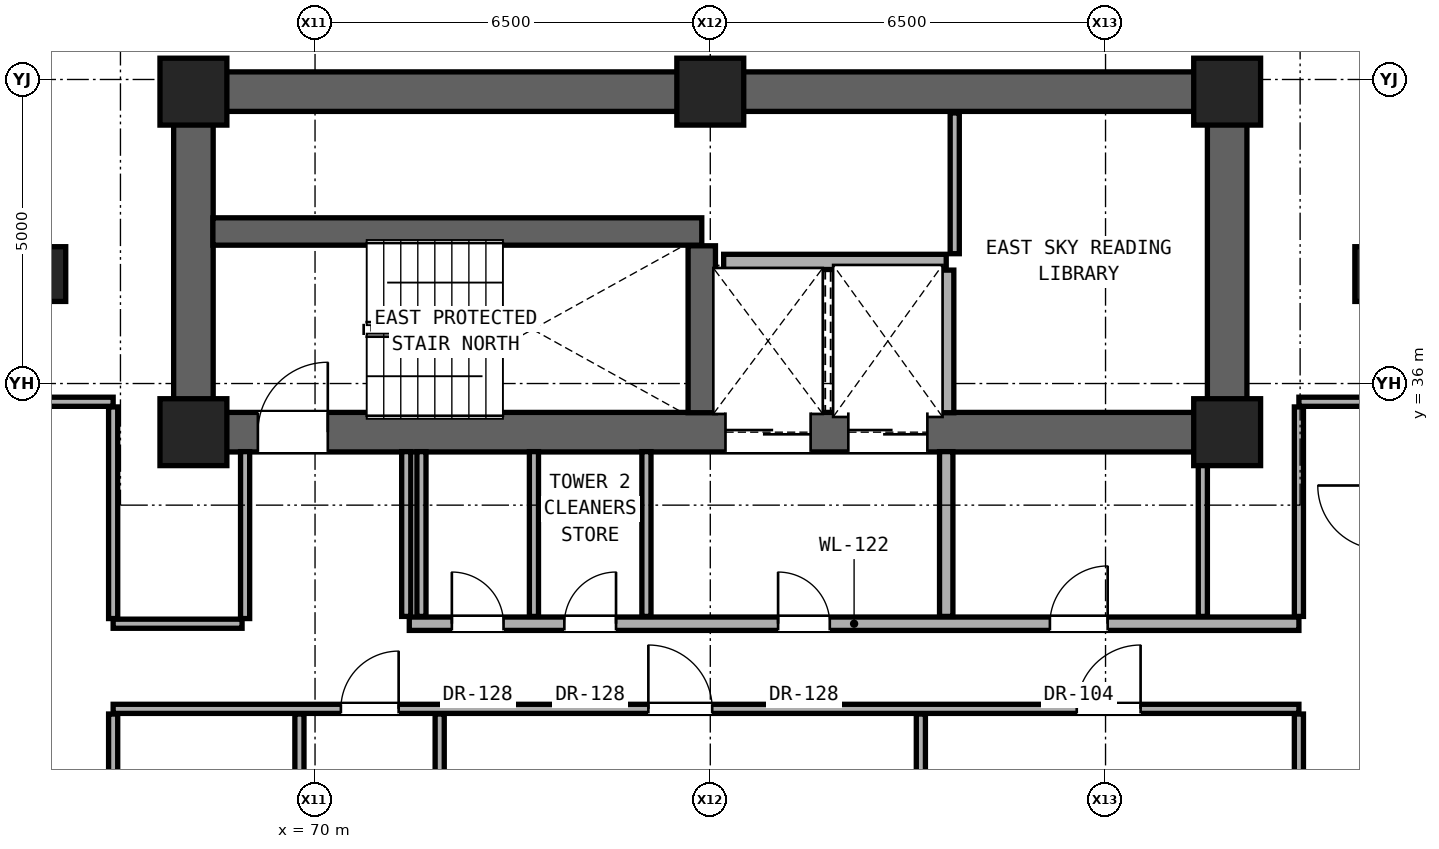
"""IFC4 building model, lengths in metres.
Left out: names, types, materials, properties, quantities, classifications, styles, units other than length and angle.
Written with IfcOpenShell. Run it as: python <this file> out.ifc"""

import sys

from ifc_helpers import new_model, si_unit, direction, frame, frame_2d, origin, origin_2d, place, context, subcontext, project, spatial, rectangle, extrude, element, fill, save


model = new_model("IFC4")
c1 = context("Model", 3, precision=1e-05, world=origin(), true_north=direction((0.0, 1.0)))
c2 = subcontext(c1, "Body", "Model", "MODEL_VIEW")
j1 = project(units=[si_unit("LENGTHUNIT", "METRE"), si_unit("PLANEANGLEUNIT", "RADIAN")], contexts=[c1])
p1 = place(None, origin())
s1 = spatial("IfcSite", under=j1, at=p1, CompositionType="ELEMENT")
p2 = place(p1, origin())
s2 = spatial("IfcBuilding", under=s1, at=p2, CompositionType="ELEMENT")
p3 = place(p2, frame((0.0, 0.0, 124.7)))
s3 = spatial("IfcBuildingStorey", under=s2, at=p3, CompositionType="ELEMENT", Elevation=124.7)
for number, where, z_axis, x_axis in (
    (1, (68.0, 35.2, 0.0), (0.0, 0.0, 1.0), (1.0, 0.0, 0.0)),
    (2, (85.0, 35.2, 0.0), (0.0, 0.0, 1.0), (1.0, 0.0, 0.0)),
    (3, (68.0, 40.8, 0.0), (0.0, 0.0, 1.0), (1.0, 0.0, 0.0)),
    (4, (76.5, 40.8, 0.0), (0.0, 0.0, 1.0), (1.0, 0.0, 0.0)),
    (5, (85.0, 40.8, 0.0), (0.0, 0.0, 1.0), (1.0, 0.0, 0.0)),
):
    element("IfcColumn", number, at=place(p3, frame(where, z_axis=z_axis, x_axis=x_axis)), inside=s3, PredefinedType="COLUMN", context=c2, shape_type="SweptSolid", body=[
        extrude(rectangle(XDim=1.1, YDim=1.1, at=origin_2d()), origin(), (0.0, 0.0, 1.0), 3.3),
    ])
for number, where, z_axis, x_axis in (
    (6, (65.6, 37.8, 0.0), (0.0, 0.0, 1.0), (1.0, 0.0, 0.0)),
    (7, (87.4, 37.8, 0.0), (0.0, 0.0, 1.0), (1.0, 0.0, 0.0)),
):
    element("IfcColumn", number, at=place(p3, frame(where, z_axis=z_axis, x_axis=x_axis)), inside=s3, PredefinedType="PILASTER", context=c2, shape_type="SweptSolid", body=[
        extrude(rectangle(XDim=0.6, YDim=0.9, at=origin_2d()), origin(), (0.0, 0.0, 1.0), 3.3),
    ])
p4 = place(p3, frame((68.0, 40.8, 0.0), z_axis=(0.0, 0.0, 1.0), x_axis=(1.0, 0.0, 0.0)))
e8 = element("IfcWall", 8, at=p4, inside=s3, PredefinedType="SHEAR", context=c2, shape_type="SweptSolid", body=[
    extrude(rectangle(XDim=17.0, YDim=0.65, at=frame_2d((8.5, 0.0))), origin(), (0.0, 0.0, 1.0), 3.08),
])
for number, where, z_axis, x_axis in (
    (9, (68.0, 35.2, 0.0), (0.0, 0.0, 1.0), (0.0, 1.0, 0.0)),
    (10, (85.0, 35.2, 0.0), (0.0, 0.0, 1.0), (0.0, 1.0, 0.0)),
):
    element("IfcWall", number, at=place(p3, frame(where, z_axis=z_axis, x_axis=x_axis)), inside=s3, PredefinedType="SHEAR", context=c2, shape_type="SweptSolid", body=[
        extrude(rectangle(XDim=5.6, YDim=0.65, at=frame_2d((2.8, 0.0))), origin(), (0.0, 0.0, 1.0), 3.08),
    ])
p5 = place(p3, frame((68.0, 35.2, 0.0), z_axis=(0.0, 0.0, 1.0), x_axis=(1.0, 0.0, 0.0)))
e11 = element("IfcWall", 11, at=p5, inside=s3, PredefinedType="SHEAR", context=c2, shape_type="SweptSolid", body=[
    extrude(rectangle(XDim=17.0, YDim=0.65, at=frame_2d((8.5, 0.0))), origin(), (0.0, 0.0, 1.0), 3.08),
])
p6 = place(p5, frame((1.06, 0.0, 0.0)))
e12 = element("IfcOpeningElement", 12, at=p6, cuts=e11, PredefinedType="OPENING", context=c2, shape_type="SweptSolid", body=[
    extrude(rectangle(XDim=1.15, YDim=2.2, at=frame_2d((0.575, 1.1))), frame((0.0, 0.335, 0.0), z_axis=(0.0, -1.0, 0.0), x_axis=(1.0, 0.0, 0.0)), (0.0, 0.0, 1.0), 0.67),
])
p7 = place(p5, frame((8.75, 0.0, 0.0)))
e13 = element("IfcOpeningElement", 13, at=p7, cuts=e11, PredefinedType="OPENING", context=c2, shape_type="SweptSolid", body=[
    extrude(rectangle(XDim=1.4, YDim=2.35, at=frame_2d((0.7, 1.175))), frame((0.0, 0.335, 0.0), z_axis=(0.0, -1.0, 0.0), x_axis=(1.0, 0.0, 0.0)), (0.0, 0.0, 1.0), 0.67),
])
p8 = place(p5, frame((10.77, 0.0, 0.0)))
e14 = element("IfcOpeningElement", 14, at=p8, cuts=e11, PredefinedType="OPENING", context=c2, shape_type="SweptSolid", body=[
    extrude(rectangle(XDim=1.3, YDim=2.3, at=frame_2d((0.65, 1.15))), frame((0.0, 0.335, 0.0), z_axis=(0.0, -1.0, 0.0), x_axis=(1.0, 0.0, 0.0)), (0.0, 0.0, 1.0), 0.67),
])
p9 = place(p3, frame((66.68, 30.65, 0.0), z_axis=(0.0, 0.0, 1.0), x_axis=(1.0, 0.0, 0.0)))
e15 = element("IfcWall", 15, at=p9, inside=s3, PredefinedType="PARTITIONING", context=c2, shape_type="SweptSolid", body=[
    extrude(rectangle(XDim=19.5, YDim=0.15, at=frame_2d((9.75, 0.0))), origin(), (0.0, 0.0, 1.0), 2.216),
])
p10 = place(p9, frame((3.745, 0.0, 0.0)))
e16 = element("IfcOpeningElement", 16, at=p10, cuts=e15, PredefinedType="OPENING", context=c2, shape_type="SweptSolid", body=[
    extrude(rectangle(XDim=0.95, YDim=2.15, at=frame_2d((0.475, 1.075))), frame((0.0, 0.085, 0.0), z_axis=(0.0, -1.0, 0.0), x_axis=(1.0, 0.0, 0.0)), (0.0, 0.0, 1.0), 0.17),
])
p11 = place(p9, frame((8.802, 0.0, 0.0)))
e17 = element("IfcOpeningElement", 17, at=p11, cuts=e15, PredefinedType="OPENING", context=c2, shape_type="SweptSolid", body=[
    extrude(rectangle(XDim=1.05, YDim=2.2, at=frame_2d((0.525, 1.1))), frame((0.0, 0.085, 0.0), z_axis=(0.0, -1.0, 0.0), x_axis=(1.0, 0.0, 0.0)), (0.0, 0.0, 1.0), 0.17),
])
p12 = place(p9, frame((15.846, 0.0, 0.0)))
e18 = element("IfcOpeningElement", 18, at=p12, cuts=e15, PredefinedType="OPENING", context=c2, shape_type="SweptSolid", body=[
    extrude(rectangle(XDim=1.05, YDim=2.2, at=frame_2d((0.525, 1.1))), frame((0.0, 0.085, 0.0), z_axis=(0.0, -1.0, 0.0), x_axis=(1.0, 0.0, 0.0)), (0.0, 0.0, 1.0), 0.17),
])
p13 = place(p3, frame((66.68, 32.05, 0.0), z_axis=(0.0, 0.0, 1.0), x_axis=(1.0, 0.0, 0.0)))
e19 = element("IfcWall", 19, at=p13, inside=s3, PredefinedType="PARTITIONING", context=c2, shape_type="SweptSolid", body=[
    extrude(rectangle(XDim=2.12, YDim=0.15, at=frame_2d((1.06, 0.0))), origin(), (0.0, 0.0, 1.0), 2.216),
])
p14 = place(p3, frame((71.55, 32.05, 0.0), z_axis=(0.0, 0.0, 1.0), x_axis=(1.0, 0.0, 0.0)))
e20 = element("IfcWall", 20, at=p14, inside=s3, PredefinedType="SOLIDWALL", context=c2, shape_type="SweptSolid", body=[
    extrude(rectangle(XDim=14.63, YDim=0.22, at=frame_2d((7.315, 0.0))), origin(), (0.0, 0.0, 1.0), 2.216),
])
p15 = place(p14, frame((6.065, 0.0, 0.0)))
e21 = element("IfcOpeningElement", 21, at=p15, cuts=e20, PredefinedType="OPENING", context=c2, shape_type="SweptSolid", body=[
    extrude(rectangle(XDim=0.85, YDim=2.01, at=frame_2d((0.425, 1.005))), frame((0.0, 0.12, 0.0), z_axis=(0.0, -1.0, 0.0), x_axis=(1.0, 0.0, 0.0)), (0.0, 0.0, 1.0), 0.24),
])
p16 = place(p14, frame((10.535, 0.0, 0.0)))
e22 = element("IfcOpeningElement", 22, at=p16, cuts=e20, PredefinedType="OPENING", context=c2, shape_type="SweptSolid", body=[
    extrude(rectangle(XDim=0.95, YDim=2.15, at=frame_2d((0.475, 1.075))), frame((0.0, 0.12, 0.0), z_axis=(0.0, -1.0, 0.0), x_axis=(1.0, 0.0, 0.0)), (0.0, 0.0, 1.0), 0.24),
])
p17 = place(p14, frame((0.7, 0.0, 0.0)))
e23 = element("IfcOpeningElement", 23, at=p17, cuts=e20, PredefinedType="OPENING", context=c2, shape_type="SweptSolid", body=[
    extrude(rectangle(XDim=0.85, YDim=2.01, at=frame_2d((0.425, 1.005))), frame((0.0, 0.12, 0.0), z_axis=(0.0, -1.0, 0.0), x_axis=(1.0, 0.0, 0.0)), (0.0, 0.0, 1.0), 0.24),
])
p18 = place(p14, frame((2.55, 0.0, 0.0)))
e24 = element("IfcOpeningElement", 24, at=p18, cuts=e20, PredefinedType="OPENING", context=c2, shape_type="SweptSolid", body=[
    extrude(rectangle(XDim=0.85, YDim=2.01, at=frame_2d((0.425, 1.005))), frame((0.0, 0.12, 0.0), z_axis=(0.0, -1.0, 0.0), x_axis=(1.0, 0.0, 0.0)), (0.0, 0.0, 1.0), 0.24),
])
p19 = place(p3, frame((65.32, 35.7, 0.0), z_axis=(0.0, 0.0, 1.0), x_axis=(1.0, 0.0, 0.0)))
e25 = element("IfcWall", 25, at=p19, inside=s3, PredefinedType="PARTITIONING", context=c2, shape_type="SweptSolid", body=[
    extrude(rectangle(XDim=1.36, YDim=0.15, at=frame_2d((0.68, 0.0))), origin(), (0.0, 0.0, 1.0), 3.08),
])
p20 = place(p3, frame((86.18, 35.7, 0.0), z_axis=(0.0, 0.0, 1.0), x_axis=(1.0, 0.0, 0.0)))
e26 = element("IfcWall", 26, at=p20, inside=s3, PredefinedType="PARTITIONING", context=c2, shape_type="SweptSolid", body=[
    extrude(rectangle(XDim=1.36, YDim=0.15, at=frame_2d((0.68, 0.0))), origin(), (0.0, 0.0, 1.0), 3.08),
])
p21 = place(p3, frame((76.72, 38.0, 0.0), z_axis=(0.0, 0.0, 1.0), x_axis=(1.0, 0.0, 0.0)))
e27 = element("IfcWall", 27, at=p21, inside=s3, PredefinedType="SOLIDWALL", context=c2, shape_type="SweptSolid", body=[
    extrude(rectangle(XDim=3.66, YDim=0.25, at=frame_2d((1.83, 0.0))), origin(), (0.0, 0.0, 1.0), 3.08),
])
p22 = place(p3, frame((68.32, 38.5, 0.0), z_axis=(0.0, 0.0, 1.0), x_axis=(1.0, 0.0, 0.0)))
e28 = element("IfcWall", 28, at=p22, inside=s3, PredefinedType="SHEAR", context=c2, shape_type="SweptSolid", body=[
    extrude(rectangle(XDim=8.04, YDim=0.45, at=frame_2d((4.02, 0.0))), origin(), (0.0, 0.0, 1.0), 3.08),
])
p23 = place(p3, frame((66.68, 24.935, 0.0), z_axis=(0.0, 0.0, 1.0), x_axis=(0.0, 1.0, 0.0)))
e29 = element("IfcWall", 29, at=p23, inside=s3, PredefinedType="PARTITIONING", context=c2, shape_type="SweptSolid", body=[
    extrude(rectangle(XDim=5.63, YDim=0.15, at=frame_2d((2.815, 0.0))), origin(), (0.0, 0.0, 1.0), 2.376),
])
p24 = place(p23, frame((2.34, 0.0, 0.0)))
e30 = element("IfcOpeningElement", 30, at=p24, cuts=e29, PredefinedType="OPENING", context=c2, shape_type="SweptSolid", body=[
    extrude(rectangle(XDim=0.95, YDim=2.15, at=frame_2d((0.475, 1.075))), frame((0.0, 0.085, 0.0), z_axis=(0.0, -1.0, 0.0), x_axis=(1.0, 0.0, 0.0)), (0.0, 0.0, 1.0), 0.17),
])
p25 = place(p3, frame((66.68, 32.135, 0.0), z_axis=(0.0, 0.0, 1.0), x_axis=(0.0, 1.0, 0.0)))
e31 = element("IfcWall", 31, at=p25, inside=s3, PredefinedType="PARTITIONING", context=c2, shape_type="SweptSolid", body=[
    extrude(rectangle(XDim=3.48, YDim=0.15, at=frame_2d((1.74, 0.0))), origin(), (0.0, 0.0, 1.0), 2.472),
])
p26 = place(p3, frame((68.85, 32.135, 0.0), z_axis=(0.0, 0.0, 1.0), x_axis=(0.0, 1.0, 0.0)))
e32 = element("IfcWall", 32, at=p26, inside=s3, PredefinedType="PARTITIONING", context=c2, shape_type="SweptSolid", body=[
    extrude(rectangle(XDim=2.745, YDim=0.15, at=frame_2d((1.373, 0.0))), origin(), (0.0, 0.0, 1.0), 3.08),
])
p27 = place(p3, frame((69.743, 24.935, 0.0), z_axis=(0.0, 0.0, 1.0), x_axis=(0.0, 1.0, 0.0)))
e33 = element("IfcWall", 33, at=p27, inside=s3, PredefinedType="PARTITIONING", context=c2, shape_type="SweptSolid", body=[
    extrude(rectangle(XDim=5.63, YDim=0.15, at=frame_2d((2.815, 0.0))), origin(), (0.0, 0.0, 1.0), 2.216),
])
for number, where, z_axis, x_axis in (
    (34, (71.5, 32.17, 0.0), (0.0, 0.0, 1.0), (0.0, 1.0, 0.0)),
    (35, (71.75, 32.17, 0.0), (0.0, 0.0, 1.0), (0.0, 1.0, 0.0)),
):
    element("IfcWall", number, at=place(p3, frame(where, z_axis=z_axis, x_axis=x_axis)), inside=s3, PredefinedType="PARTITIONING", context=c2, shape_type="SweptSolid", body=[
        extrude(rectangle(XDim=2.71, YDim=0.15, at=frame_2d((1.355, 0.0))), origin(), (0.0, 0.0, 1.0), 3.08),
    ])
p28 = place(p3, frame((72.05, 26.17, 0.0), z_axis=(0.0, 0.0, 1.0), x_axis=(0.0, 1.0, 0.0)))
e36 = element("IfcWall", 36, at=p28, inside=s3, PredefinedType="PARTITIONING", context=c2, shape_type="SweptSolid", body=[
    extrude(rectangle(XDim=4.395, YDim=0.15, at=frame_2d((2.198, 0.0))), origin(), (0.0, 0.0, 1.0), 2.216),
])
for number, where, z_axis, x_axis in (
    (37, (73.6, 32.17, 0.0), (0.0, 0.0, 1.0), (0.0, 1.0, 0.0)),
    (38, (75.45, 32.17, 0.0), (0.0, 0.0, 1.0), (0.0, 1.0, 0.0)),
):
    element("IfcWall", number, at=place(p3, frame(where, z_axis=z_axis, x_axis=x_axis)), inside=s3, PredefinedType="PARTITIONING", context=c2, shape_type="SweptSolid", body=[
        extrude(rectangle(XDim=2.71, YDim=0.15, at=frame_2d((1.355, 0.0))), origin(), (0.0, 0.0, 1.0), 3.08),
    ])
p29 = place(p3, frame((76.36, 35.52, 0.0), z_axis=(0.0, 0.0, 1.0), x_axis=(0.0, 1.0, 0.0)))
e39 = element("IfcWall", 39, at=p29, inside=s3, PredefinedType="SHEAR", context=c2, shape_type="SweptSolid", body=[
    extrude(rectangle(XDim=2.745, YDim=0.45, at=frame_2d((1.373, 0.0))), origin(), (0.0, 0.0, 1.0), 3.08),
])
p30 = place(p3, frame((79.963, 26.17, 0.0), z_axis=(0.0, 0.0, 1.0), x_axis=(0.0, 1.0, 0.0)))
e40 = element("IfcWall", 40, at=p30, inside=s3, PredefinedType="PARTITIONING", context=c2, shape_type="SweptSolid", body=[
    extrude(rectangle(XDim=4.395, YDim=0.15, at=frame_2d((2.198, 0.0))), origin(), (0.0, 0.0, 1.0), 2.216),
])
p31 = place(p3, frame((80.38, 32.17, 0.0), z_axis=(0.0, 0.0, 1.0), x_axis=(0.0, 1.0, 0.0)))
e41 = element("IfcWall", 41, at=p31, inside=s3, PredefinedType="SOLIDWALL", context=c2, shape_type="SweptSolid", body=[
    extrude(rectangle(XDim=2.71, YDim=0.22, at=frame_2d((1.355, 0.0))), origin(), (0.0, 0.0, 1.0), 3.08),
])
p32 = place(p3, frame((80.38, 35.52, 0.0), z_axis=(0.0, 0.0, 1.0), x_axis=(0.0, 1.0, 0.0)))
e42 = element("IfcWall", 42, at=p32, inside=s3, PredefinedType="SOLIDWALL", context=c2, shape_type="SweptSolid", body=[
    extrude(rectangle(XDim=2.345, YDim=0.25, at=frame_2d((1.172, 0.0))), origin(), (0.0, 0.0, 1.0), 3.08),
])
p33 = place(p3, frame((80.52, 38.135, 0.0), z_axis=(0.0, 0.0, 1.0), x_axis=(0.0, 1.0, 0.0)))
e43 = element("IfcWall", 43, at=p33, inside=s3, PredefinedType="PARTITIONING", context=c2, shape_type="SweptSolid", body=[
    extrude(rectangle(XDim=2.315, YDim=0.15, at=frame_2d((1.157, 0.0))), origin(), (0.0, 0.0, 1.0), 3.08),
])
p34 = place(p3, frame((84.6, 32.17, 0.0), z_axis=(0.0, 0.0, 1.0), x_axis=(0.0, 1.0, 0.0)))
e44 = element("IfcWall", 44, at=p34, inside=s3, PredefinedType="PARTITIONING", context=c2, shape_type="SweptSolid", body=[
    extrude(rectangle(XDim=2.71, YDim=0.15, at=frame_2d((1.355, 0.0))), origin(), (0.0, 0.0, 1.0), 3.08),
])
p35 = place(p3, frame((86.18, 26.17, 0.0), z_axis=(0.0, 0.0, 1.0), x_axis=(0.0, 1.0, 0.0)))
e45 = element("IfcWall", 45, at=p35, inside=s3, PredefinedType="PARTITIONING", context=c2, shape_type="SweptSolid", body=[
    extrude(rectangle(XDim=4.395, YDim=0.15, at=frame_2d((2.198, 0.0))), origin(), (0.0, 0.0, 1.0), 2.376),
])
p36 = place(p3, frame((86.18, 32.17, 0.0), z_axis=(0.0, 0.0, 1.0), x_axis=(0.0, 1.0, 0.0)))
e46 = element("IfcWall", 46, at=p36, inside=s3, PredefinedType="PARTITIONING", context=c2, shape_type="SweptSolid", body=[
    extrude(rectangle(XDim=3.445, YDim=0.15, at=frame_2d((1.723, 0.0))), origin(), (0.0, 0.0, 1.0), 2.472),
])
p37 = place(p6, origin())
e47 = element("IfcDoor", 47, at=p37, inside=s3, OperationType="SINGLE_SWING_RIGHT", PredefinedType="DOOR", context=c2, shape_type="SweptSolid", body=[
    extrude(rectangle(XDim=1.15, YDim=2.2, at=frame_2d((0.575, 1.1))), frame((0.0, 0.025, 0.0), z_axis=(0.0, -1.0, 0.0), x_axis=(1.0, 0.0, 0.0)), (0.0, 0.0, 1.0), 0.05),
])
fill(e12, e47)
p38 = place(p15, origin())
e48 = element("IfcDoor", 48, at=p38, inside=s3, OperationType="SINGLE_SWING_LEFT", PredefinedType="DOOR", context=c2, shape_type="SweptSolid", body=[
    extrude(rectangle(XDim=0.85, YDim=2.01, at=frame_2d((0.425, 1.005))), frame((0.0, 0.025, 0.0), z_axis=(0.0, -1.0, 0.0), x_axis=(1.0, 0.0, 0.0)), (0.0, 0.0, 1.0), 0.05),
])
fill(e21, e48)
p39 = place(p16, origin())
e49 = element("IfcDoor", 49, at=p39, inside=s3, OperationType="SINGLE_SWING_RIGHT", PredefinedType="DOOR", context=c2, shape_type="SweptSolid", body=[
    extrude(rectangle(XDim=0.95, YDim=2.15, at=frame_2d((0.475, 1.075))), frame((0.0, 0.025, 0.0), z_axis=(0.0, -1.0, 0.0), x_axis=(1.0, 0.0, 0.0)), (0.0, 0.0, 1.0), 0.05),
])
fill(e22, e49)
p40 = place(p17, origin())
e50 = element("IfcDoor", 50, at=p40, inside=s3, OperationType="SINGLE_SWING_LEFT", PredefinedType="DOOR", context=c2, shape_type="SweptSolid", body=[
    extrude(rectangle(XDim=0.85, YDim=2.01, at=frame_2d((0.425, 1.005))), frame((0.0, 0.025, 0.0), z_axis=(0.0, -1.0, 0.0), x_axis=(1.0, 0.0, 0.0)), (0.0, 0.0, 1.0), 0.05),
])
fill(e23, e50)
p41 = place(p18, origin())
e51 = element("IfcDoor", 51, at=p41, inside=s3, OperationType="SINGLE_SWING_RIGHT", PredefinedType="DOOR", context=c2, shape_type="SweptSolid", body=[
    extrude(rectangle(XDim=0.85, YDim=2.01, at=frame_2d((0.425, 1.005))), frame((0.0, 0.025, 0.0), z_axis=(0.0, -1.0, 0.0), x_axis=(1.0, 0.0, 0.0)), (0.0, 0.0, 1.0), 0.05),
])
fill(e24, e51)
p42 = place(p10, origin())
e52 = element("IfcDoor", 52, at=p42, inside=s3, OperationType="SINGLE_SWING_RIGHT", PredefinedType="DOOR", context=c2, shape_type="SweptSolid", body=[
    extrude(rectangle(XDim=0.95, YDim=2.15, at=frame_2d((0.475, 1.075))), frame((0.0, 0.025, 0.0), z_axis=(0.0, -1.0, 0.0), x_axis=(1.0, 0.0, 0.0)), (0.0, 0.0, 1.0), 0.05),
])
fill(e16, e52)
p43 = place(p11, origin())
e53 = element("IfcDoor", 53, at=p43, inside=s3, OperationType="SINGLE_SWING_LEFT", PredefinedType="DOOR", context=c2, shape_type="SweptSolid", body=[
    extrude(rectangle(XDim=1.05, YDim=2.2, at=frame_2d((0.525, 1.1))), frame((0.0, 0.025, 0.0), z_axis=(0.0, -1.0, 0.0), x_axis=(1.0, 0.0, 0.0)), (0.0, 0.0, 1.0), 0.05),
])
fill(e17, e53)
p44 = place(p12, origin())
e54 = element("IfcDoor", 54, at=p44, inside=s3, OperationType="SINGLE_SWING_RIGHT", PredefinedType="DOOR", context=c2, shape_type="SweptSolid", body=[
    extrude(rectangle(XDim=1.05, YDim=2.2, at=frame_2d((0.525, 1.1))), frame((0.0, 0.025, 0.0), z_axis=(0.0, -1.0, 0.0), x_axis=(1.0, 0.0, 0.0)), (0.0, 0.0, 1.0), 0.05),
])
fill(e18, e54)
p45 = place(p7, origin())
e55 = element("IfcDoor", 55, at=p45, inside=s3, OperationType="DOUBLE_DOOR_SLIDING", PredefinedType="DOOR", context=c2, shape_type="SweptSolid", body=[
    extrude(rectangle(XDim=1.4, YDim=2.35, at=frame_2d((0.7, 1.175))), frame((0.0, 0.025, 0.0), z_axis=(0.0, -1.0, 0.0), x_axis=(1.0, 0.0, 0.0)), (0.0, 0.0, 1.0), 0.05),
])
fill(e13, e55)
p46 = place(p8, origin())
e56 = element("IfcDoor", 56, at=p46, inside=s3, OperationType="DOUBLE_DOOR_SLIDING", PredefinedType="DOOR", context=c2, shape_type="SweptSolid", body=[
    extrude(rectangle(XDim=1.3, YDim=2.3, at=frame_2d((0.65, 1.15))), frame((0.0, 0.025, 0.0), z_axis=(0.0, -1.0, 0.0), x_axis=(1.0, 0.0, 0.0)), (0.0, 0.0, 1.0), 0.05),
])
fill(e14, e56)
save(model, sys.argv[1])
